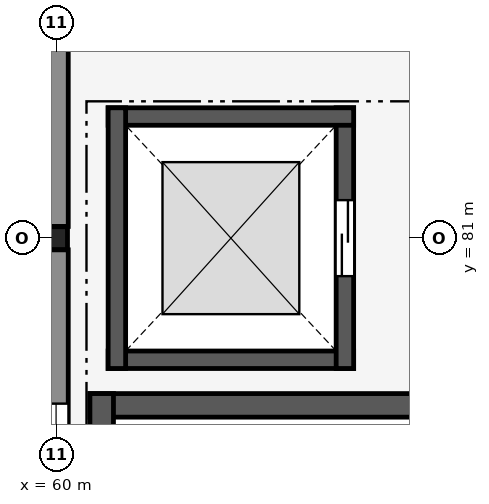
"""IFC4 building model, lengths in metres.
Left out: names, types, materials, properties, quantities, classifications, styles, units other than length and angle.
Written with IfcOpenShell. Run it as: python <this file> out.ifc"""

import sys

from ifc_helpers import new_model, si_unit, direction, frame, frame_2d, origin, origin_2d, place, context, subcontext, project, spatial, rectangle, hollow_rectangle, extrude, element, fill, save


model = new_model("IFC4")
c1 = context("Model", 3, precision=1e-05, world=origin(), true_north=direction((0.0, 1.0)))
c2 = subcontext(c1, "Body", "Model", "MODEL_VIEW")
j1 = project(units=[si_unit("LENGTHUNIT", "METRE"), si_unit("PLANEANGLEUNIT", "RADIAN")], contexts=[c1])
p1 = place(None, origin())
s1 = spatial("IfcSite", under=j1, at=p1, CompositionType="ELEMENT")
p2 = place(p1, origin())
s2 = spatial("IfcBuilding", under=s1, at=p2, CompositionType="ELEMENT")
p3 = place(p2, frame((0.0, 0.0, 18.0)))
s3 = spatial("IfcBuildingStorey", under=s2, at=p3, CompositionType="ELEMENT", Elevation=18.0)
p4 = place(p3, frame((60.0, 81.0, 0.0), z_axis=(0.0, 0.0, 1.0), x_axis=(1.0, 0.0, 0.0)))
e1 = element("IfcColumn", 1, at=p4, inside=s3, PredefinedType="COLUMN", context=c2, shape_type="SweptSolid", body=[
    extrude(hollow_rectangle(XDim=0.3, YDim=0.3, WallThickness=0.016, InnerFilletRadius=0.016, OuterFilletRadius=0.032, at=origin_2d()), origin(), (0.0, 0.0, 1.0), 4.2),
])
p5 = place(p3, frame((60.0, 75.0, 0.0), z_axis=(0.0, 0.0, 1.0), x_axis=(0.0, 1.0, 0.0)))
e2 = element("IfcWall", 2, at=p5, inside=s3, PredefinedType="SOLIDWALL", context=c2, shape_type="SweptSolid", body=[
    extrude(rectangle(XDim=5.846, YDim=0.32, at=frame_2d((2.923, 0.0))), origin(), (0.0, 0.0, 1.0), 3.09),
])
p6 = place(p5, frame((2.023, 0.0, 1.1)))
e3 = element("IfcOpeningElement", 3, at=p6, cuts=e2, PredefinedType="OPENING", context=c2, shape_type="SweptSolid", body=[
    extrude(rectangle(XDim=1.8, YDim=1.2, at=frame_2d((0.9, 0.6))), frame((0.0, 0.17, 0.0), z_axis=(0.0, -1.0, 0.0), x_axis=(1.0, 0.0, 0.0)), (0.0, 0.0, 1.0), 0.34),
])
p7 = place(p3, frame((60.0, 81.154, 0.0), z_axis=(0.0, 0.0, 1.0), x_axis=(0.0, 1.0, 0.0)))
e4 = element("IfcWall", 4, at=p7, inside=s3, PredefinedType="SOLIDWALL", context=c2, shape_type="SweptSolid", body=[
    extrude(rectangle(XDim=5.639, YDim=0.32, at=frame_2d((2.819, 0.0))), origin(), (0.0, 0.0, 1.0), 3.09),
])
p8 = place(p3, frame((65.255, 78.8, 0.0), z_axis=(0.0, 0.0, 1.0), x_axis=(-1.0, 0.0, 0.0)))
e5 = element("IfcWall", 5, at=p8, inside=s3, PredefinedType="SHEAR", context=c2, shape_type="SweptSolid", body=[
    extrude(rectangle(XDim=4.81, YDim=0.31, at=frame_2d((2.405, 0.0))), origin(), (0.0, 0.0, 1.0), 4.06),
])
p9 = place(p3, frame((60.6, 78.955, 0.0), z_axis=(0.0, 0.0, 1.0), x_axis=(0.0, -1.0, 0.0)))
e6 = element("IfcWall", 6, at=p9, inside=s3, PredefinedType="SHEAR", context=c2, shape_type="SweptSolid", body=[
    extrude(rectangle(XDim=9.61, YDim=0.31, at=frame_2d((4.805, 0.0))), origin(), (0.0, 0.0, 1.0), 4.06),
])
p10 = place(p3, frame((60.685, 79.4, 0.0), z_axis=(0.0, 0.0, 1.0), x_axis=(1.0, 0.0, 0.0)))
e7 = element("IfcWall", 7, at=p10, inside=s3, PredefinedType="SHEAR", context=c2, shape_type="SweptSolid", body=[
    extrude(rectangle(XDim=3.23, YDim=0.23, at=frame_2d((1.615, 0.0))), origin(), (0.0, 0.0, 1.0), 4.2),
])
p11 = place(p3, frame((63.8, 79.285, 0.0), z_axis=(0.0, 0.0, 1.0), x_axis=(0.0, 1.0, 0.0)))
e8 = element("IfcWall", 8, at=p11, inside=s3, PredefinedType="SHEAR", context=c2, shape_type="SweptSolid", body=[
    extrude(rectangle(XDim=3.43, YDim=0.23, at=frame_2d((1.715, 0.0))), origin(), (0.0, 0.0, 1.0), 4.2),
])
p12 = place(p11, frame((1.215, 0.0, 0.0)))
e9 = element("IfcOpeningElement", 9, at=p12, cuts=e8, PredefinedType="OPENING", context=c2, shape_type="SweptSolid", body=[
    extrude(rectangle(XDim=1.0, YDim=2.15, at=frame_2d((0.5, 1.075))), frame((0.0, 0.125, 0.0), z_axis=(0.0, -1.0, 0.0), x_axis=(1.0, 0.0, 0.0)), (0.0, 0.0, 1.0), 0.25),
])
p13 = place(p3, frame((63.915, 82.6, 0.0), z_axis=(0.0, 0.0, 1.0), x_axis=(-1.0, 0.0, 0.0)))
e10 = element("IfcWall", 10, at=p13, inside=s3, PredefinedType="SHEAR", context=c2, shape_type="SweptSolid", body=[
    extrude(rectangle(XDim=3.23, YDim=0.23, at=frame_2d((1.615, 0.0))), origin(), (0.0, 0.0, 1.0), 4.2),
])
p14 = place(p3, frame((60.8, 82.715, 0.0), z_axis=(0.0, 0.0, 1.0), x_axis=(0.0, -1.0, 0.0)))
e11 = element("IfcWall", 11, at=p14, inside=s3, PredefinedType="SHEAR", context=c2, shape_type="SweptSolid", body=[
    extrude(rectangle(XDim=3.43, YDim=0.23, at=frame_2d((1.715, 0.0))), origin(), (0.0, 0.0, 1.0), 4.2),
])
p15 = place(p6, origin())
e12 = element("IfcWindow", 12, at=p15, inside=s3, PartitioningType="SINGLE_PANEL", PredefinedType="WINDOW", context=c2, shape_type="SweptSolid", body=[
    extrude(rectangle(XDim=1.8, YDim=1.2, at=frame_2d((0.9, 0.6))), frame((0.0, 0.03, 0.0), z_axis=(0.0, -1.0, 0.0), x_axis=(1.0, 0.0, 0.0)), (0.0, 0.0, 1.0), 0.06),
])
fill(e3, e12)
p16 = place(p12, origin())
e13 = element("IfcDoor", 13, at=p16, inside=s3, OperationType="SLIDING_TO_LEFT", PredefinedType="DOOR", context=c2, shape_type="SweptSolid", body=[
    extrude(rectangle(XDim=1.0, YDim=2.15, at=frame_2d((0.5, 1.075))), frame((0.0, 0.025, 0.0), z_axis=(0.0, -1.0, 0.0), x_axis=(1.0, 0.0, 0.0)), (0.0, 0.0, 1.0), 0.05),
])
fill(e9, e13)
save(model, sys.argv[1])
